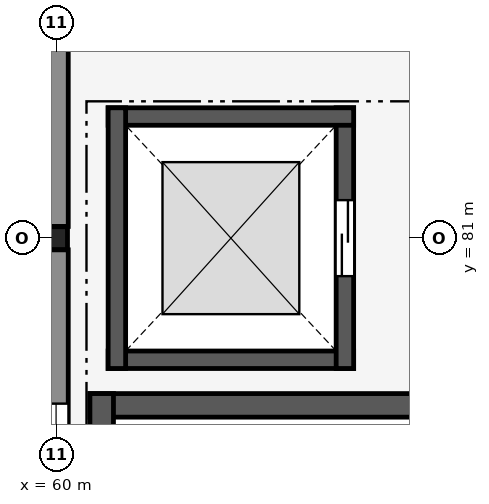
"""IFC4 building model, lengths in metres.
Left out: names, types, materials, properties, quantities, classifications, styles, units other than length and angle.
Written with IfcOpenShell. Run it as: python <this file> out.ifc"""

import sys

from ifc_helpers import new_model, si_unit, direction, frame, frame_2d, origin, origin_2d, place, context, subcontext, project, spatial, rectangle, hollow_rectangle, extrude, element, fill, save


model = new_model("IFC4")
c1 = context("Model", 3, precision=1e-05, world=origin(), true_north=direction((0.0, 1.0)))
c2 = subcontext(c1, "Body", "Model", "MODEL_VIEW")
j1 = project(units=[si_unit("LENGTHUNIT", "METRE"), si_unit("PLANEANGLEUNIT", "RADIAN")], contexts=[c1])
p1 = place(None, origin())
s1 = spatial("IfcSite", under=j1, at=p1, CompositionType="ELEMENT")
p2 = place(p1, origin())
s2 = spatial("IfcBuilding", under=s1, at=p2, CompositionType="ELEMENT")
p3 = place(p2, frame((0.0, 0.0, 4.8)))
s3 = spatial("IfcBuildingStorey", under=s2, at=p3, CompositionType="ELEMENT", Elevation=4.8)
p4 = place(p3, frame((60.0, 81.0, 0.0), z_axis=(0.0, 0.0, 1.0), x_axis=(1.0, 0.0, 0.0)))
e1 = element("IfcColumn", 1, at=p4, inside=s3, PredefinedType="COLUMN", context=c2, shape_type="SweptSolid", body=[
    extrude(hollow_rectangle(XDim=0.3, YDim=0.3, WallThickness=0.016, InnerFilletRadius=0.016, OuterFilletRadius=0.032, at=origin_2d()), origin(), (0.0, 0.0, 1.0), 4.5),
])
p5 = place(p3, frame((60.0, 75.0, 0.0), z_axis=(0.0, 0.0, 1.0), x_axis=(0.0, 1.0, 0.0)))
e2 = element("IfcWall", 2, at=p5, inside=s3, PredefinedType="SOLIDWALL", context=c2, shape_type="SweptSolid", body=[
    extrude(rectangle(XDim=5.846, YDim=0.32, at=frame_2d((2.923, 0.0))), origin(), (0.0, 0.0, 1.0), 3.39),
])
p6 = place(p5, frame((2.023, 0.0, 1.1)))
e3 = element("IfcOpeningElement", 3, at=p6, cuts=e2, PredefinedType="OPENING", context=c2, shape_type="SweptSolid", body=[
    extrude(rectangle(XDim=1.8, YDim=1.2, at=frame_2d((0.9, 0.6))), frame((0.0, 0.17, 0.0), z_axis=(0.0, -1.0, 0.0), x_axis=(1.0, 0.0, 0.0)), (0.0, 0.0, 1.0), 0.34),
])
p7 = place(p3, frame((60.0, 81.154, 0.0), z_axis=(0.0, 0.0, 1.0), x_axis=(0.0, 1.0, 0.0)))
e4 = element("IfcWall", 4, at=p7, inside=s3, PredefinedType="SOLIDWALL", context=c2, shape_type="SweptSolid", body=[
    extrude(rectangle(XDim=5.642, YDim=0.32, at=frame_2d((2.821, 0.0))), origin(), (0.0, 0.0, 1.0), 3.39),
])
p8 = place(p3, frame((65.255, 78.8, 0.0), z_axis=(0.0, 0.0, 1.0), x_axis=(-1.0, 0.0, 0.0)))
e5 = element("IfcWall", 5, at=p8, inside=s3, PredefinedType="SHEAR", context=c2, shape_type="SweptSolid", body=[
    extrude(rectangle(XDim=4.81, YDim=0.31, at=frame_2d((2.405, 0.0))), origin(), (0.0, 0.0, 1.0), 4.36),
])
p9 = place(p3, frame((60.6, 78.955, 0.0), z_axis=(0.0, 0.0, 1.0), x_axis=(0.0, -1.0, 0.0)))
e6 = element("IfcWall", 6, at=p9, inside=s3, PredefinedType="SHEAR", context=c2, shape_type="SweptSolid", body=[
    extrude(rectangle(XDim=9.61, YDim=0.31, at=frame_2d((4.805, 0.0))), origin(), (0.0, 0.0, 1.0), 4.36),
])
p10 = place(p3, frame((60.685, 79.4, 0.0), z_axis=(0.0, 0.0, 1.0), x_axis=(1.0, 0.0, 0.0)))
e7 = element("IfcWall", 7, at=p10, inside=s3, PredefinedType="SHEAR", context=c2, shape_type="SweptSolid", body=[
    extrude(rectangle(XDim=3.23, YDim=0.23, at=frame_2d((1.615, 0.0))), origin(), (0.0, 0.0, 1.0), 4.5),
])
p11 = place(p3, frame((63.8, 79.285, 0.0), z_axis=(0.0, 0.0, 1.0), x_axis=(0.0, 1.0, 0.0)))
e8 = element("IfcWall", 8, at=p11, inside=s3, PredefinedType="SHEAR", context=c2, shape_type="SweptSolid", body=[
    extrude(rectangle(XDim=3.43, YDim=0.23, at=frame_2d((1.715, 0.0))), origin(), (0.0, 0.0, 1.0), 4.5),
])
p12 = place(p11, frame((1.215, 0.0, 0.0)))
e9 = element("IfcOpeningElement", 9, at=p12, cuts=e8, PredefinedType="OPENING", context=c2, shape_type="SweptSolid", body=[
    extrude(rectangle(XDim=1.0, YDim=2.15, at=frame_2d((0.5, 1.075))), frame((0.0, 0.125, 0.0), z_axis=(0.0, -1.0, 0.0), x_axis=(1.0, 0.0, 0.0)), (0.0, 0.0, 1.0), 0.25),
])
p13 = place(p3, frame((63.915, 82.6, 0.0), z_axis=(0.0, 0.0, 1.0), x_axis=(-1.0, 0.0, 0.0)))
e10 = element("IfcWall", 10, at=p13, inside=s3, PredefinedType="SHEAR", context=c2, shape_type="SweptSolid", body=[
    extrude(rectangle(XDim=3.23, YDim=0.23, at=frame_2d((1.615, 0.0))), origin(), (0.0, 0.0, 1.0), 4.5),
])
p14 = place(p3, frame((60.8, 82.715, 0.0), z_axis=(0.0, 0.0, 1.0), x_axis=(0.0, -1.0, 0.0)))
e11 = element("IfcWall", 11, at=p14, inside=s3, PredefinedType="SHEAR", context=c2, shape_type="SweptSolid", body=[
    extrude(rectangle(XDim=3.43, YDim=0.23, at=frame_2d((1.715, 0.0))), origin(), (0.0, 0.0, 1.0), 4.5),
])
p15 = place(p6, origin())
e12 = element("IfcWindow", 12, at=p15, inside=s3, PartitioningType="SINGLE_PANEL", PredefinedType="WINDOW", context=c2, shape_type="SweptSolid", body=[
    extrude(rectangle(XDim=1.8, YDim=1.2, at=frame_2d((0.9, 0.6))), frame((0.0, 0.03, 0.0), z_axis=(0.0, -1.0, 0.0), x_axis=(1.0, 0.0, 0.0)), (0.0, 0.0, 1.0), 0.06),
])
fill(e3, e12)
p16 = place(p12, origin())
e13 = element("IfcDoor", 13, at=p16, inside=s3, OperationType="SLIDING_TO_LEFT", PredefinedType="DOOR", context=c2, shape_type="SweptSolid", body=[
    extrude(rectangle(XDim=1.0, YDim=2.15, at=frame_2d((0.5, 1.075))), frame((0.0, 0.025, 0.0), z_axis=(0.0, -1.0, 0.0), x_axis=(1.0, 0.0, 0.0)), (0.0, 0.0, 1.0), 0.05),
])
fill(e9, e13)
save(model, sys.argv[1])
